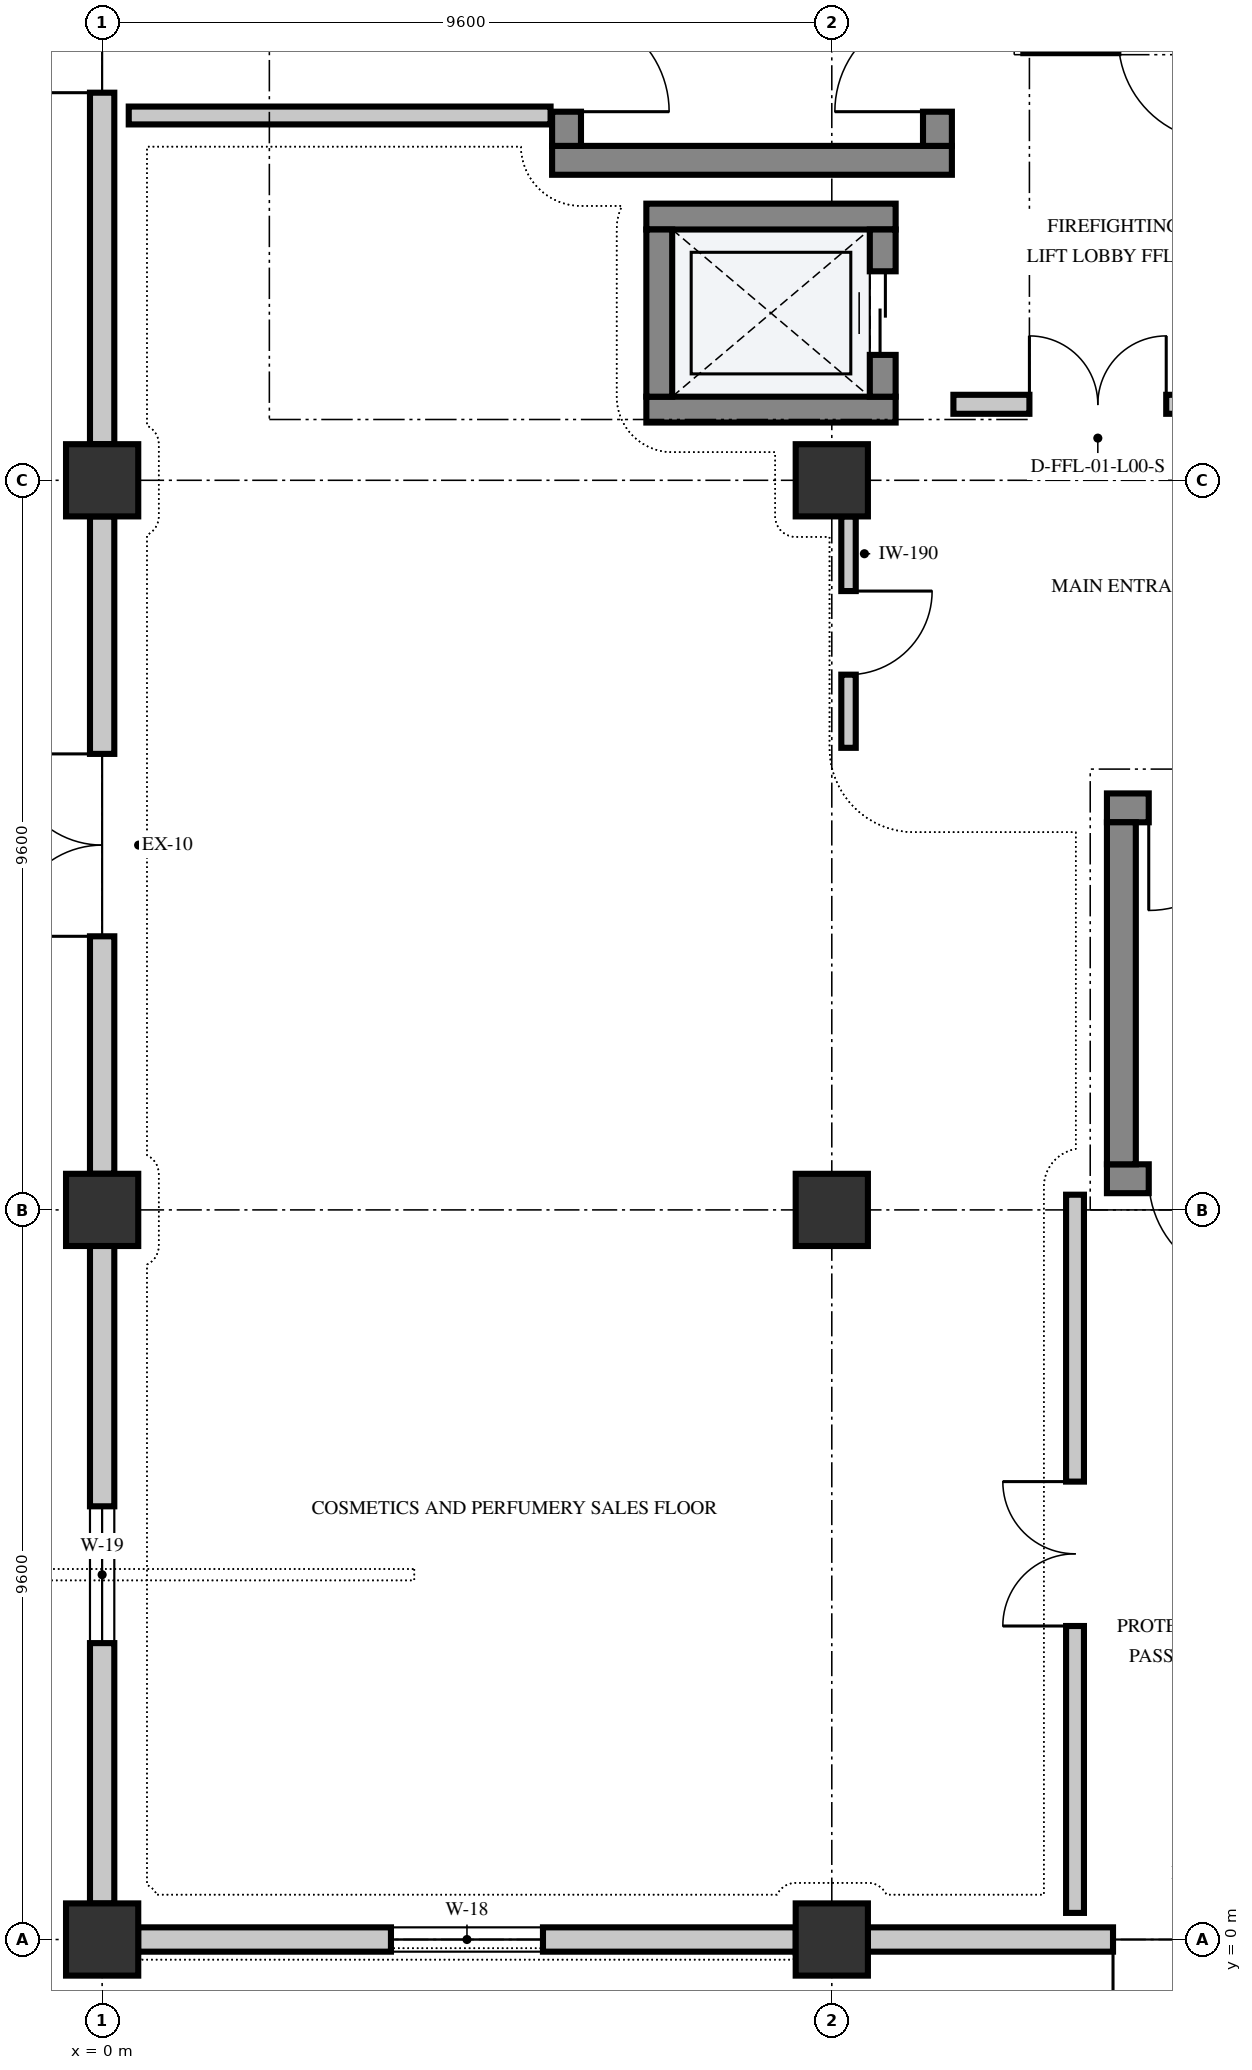
"""IFC4 building model, lengths in metres.
Left out: names, types, materials, properties, quantities, classifications, styles, units other than length and angle.
Written with IfcOpenShell. Run it as: python <this file> out.ifc"""

import sys

from ifc_helpers import new_model, si_unit, direction, frame, frame_2d, origin, origin_2d, place, context, subcontext, project, spatial, rectangle, extrude, element, fill, save


model = new_model("IFC4")
c1 = context("Model", 3, precision=1e-05, world=origin(), true_north=direction((0.0, 1.0)))
c2 = subcontext(c1, "Body", "Model", "MODEL_VIEW")
j1 = project(units=[si_unit("LENGTHUNIT", "METRE"), si_unit("PLANEANGLEUNIT", "RADIAN")], contexts=[c1])
p1 = place(None, origin())
s1 = spatial("IfcSite", under=j1, at=p1, CompositionType="ELEMENT")
p2 = place(p1, origin())
s2 = spatial("IfcBuilding", under=s1, at=p2, CompositionType="ELEMENT")
p3 = place(p2, origin())
s3 = spatial("IfcBuildingStorey", under=s2, at=p3, CompositionType="ELEMENT", Elevation=0.0)
for number, where, z_axis, x_axis in (
    (1, (0.0, 0.0, -0.3), (0.0, 0.0, 1.0), (1.0, 0.0, 0.0)),
    (2, (0.0, 9.6, -0.3), (0.0, 0.0, 1.0), (1.0, 0.0, 0.0)),
):
    element("IfcColumn", number, at=place(p3, frame(where, z_axis=z_axis, x_axis=x_axis)), inside=s3, PredefinedType="COLUMN", context=c2, shape_type="SweptSolid", body=[
        extrude(rectangle(XDim=0.95, YDim=0.95, at=origin_2d()), origin(), (0.0, 0.0, 1.0), 5.7),
    ])
p4 = place(p3, frame((0.0, 19.2, 0.0), z_axis=(0.0, 0.0, 1.0), x_axis=(1.0, 0.0, 0.0)))
e3 = element("IfcColumn", 3, at=p4, inside=s3, PredefinedType="COLUMN", context=c2, shape_type="SweptSolid", body=[
    extrude(rectangle(XDim=0.95, YDim=0.95, at=origin_2d()), origin(), (0.0, 0.0, 1.0), 5.4),
])
p5 = place(p3, frame((9.6, 0.0, -0.3), z_axis=(0.0, 0.0, 1.0), x_axis=(1.0, 0.0, 0.0)))
e4 = element("IfcColumn", 4, at=p5, inside=s3, PredefinedType="COLUMN", context=c2, shape_type="SweptSolid", body=[
    extrude(rectangle(XDim=0.95, YDim=0.95, at=origin_2d()), origin(), (0.0, 0.0, 1.0), 5.7),
])
for number, where, z_axis, x_axis in (
    (5, (9.6, 9.6, 0.0), (0.0, 0.0, 1.0), (1.0, 0.0, 0.0)),
    (6, (9.6, 19.2, 0.0), (0.0, 0.0, 1.0), (1.0, 0.0, 0.0)),
):
    element("IfcColumn", number, at=place(p3, frame(where, z_axis=z_axis, x_axis=x_axis)), inside=s3, PredefinedType="COLUMN", context=c2, shape_type="SweptSolid", body=[
        extrude(rectangle(XDim=0.95, YDim=0.95, at=origin_2d()), origin(), (0.0, 0.0, 1.0), 5.4),
    ])
p6 = place(p3, frame((18.725, 0.0, 0.0), z_axis=(0.0, 0.0, 1.0), x_axis=(-1.0, 0.0, 0.0)))
e7 = element("IfcWall", 7, at=p6, inside=s3, PredefinedType="SOLIDWALL", context=c2, shape_type="SweptSolid", body=[
    extrude(rectangle(XDim=8.65, YDim=0.32, at=frame_2d((4.325, 0.0))), origin(), (0.0, 0.0, 1.0), 5.09),
])
p7 = place(p6, frame((3.225, 0.0, 0.0)))
e8 = element("IfcOpeningElement", 8, at=p7, cuts=e7, PredefinedType="OPENING", context=c2, shape_type="SweptSolid", body=[
    extrude(rectangle(XDim=2.2, YDim=2.3, at=frame_2d((1.1, 1.15))), frame((0.0, 0.172, 0.0), z_axis=(0.0, -1.0, 0.0), x_axis=(1.0, 0.0, 0.0)), (0.0, 0.0, 1.0), 0.344),
])
p8 = place(p3, frame((9.127, 0.0, 0.0), z_axis=(0.0, 0.0, 1.0), x_axis=(-1.0, 0.0, 0.0)))
e9 = element("IfcWall", 9, at=p8, inside=s3, PredefinedType="SOLIDWALL", context=c2, shape_type="SweptSolid", body=[
    extrude(rectangle(XDim=8.654, YDim=0.32, at=frame_2d((4.327, 0.0))), origin(), (0.0, 0.0, 1.0), 5.09),
])
p9 = place(p8, frame((3.327, 0.0, 2.25)))
e10 = element("IfcOpeningElement", 10, at=p9, cuts=e9, PredefinedType="OPENING", context=c2, shape_type="SweptSolid", body=[
    extrude(rectangle(XDim=2.0, YDim=1.1, at=frame_2d((1.0, 0.55))), frame((0.0, 0.172, 0.0), z_axis=(0.0, -1.0, 0.0), x_axis=(1.0, 0.0, 0.0)), (0.0, 0.0, 1.0), 0.344),
])
p10 = place(p3, frame((0.0, 0.473, 0.0), z_axis=(0.0, 0.0, 1.0), x_axis=(0.0, 1.0, 0.0)))
e11 = element("IfcWall", 11, at=p10, inside=s3, PredefinedType="SOLIDWALL", context=c2, shape_type="SweptSolid", body=[
    extrude(rectangle(XDim=8.654, YDim=0.32, at=frame_2d((4.327, 0.0))), origin(), (0.0, 0.0, 1.0), 5.09),
])
p11 = place(p10, frame((3.427, 0.0, 1.2)))
e12 = element("IfcOpeningElement", 12, at=p11, cuts=e11, PredefinedType="OPENING", context=c2, shape_type="SweptSolid", body=[
    extrude(rectangle(XDim=1.8, YDim=1.5, at=frame_2d((0.9, 0.75))), frame((0.0, 0.172, 0.0), z_axis=(0.0, -1.0, 0.0), x_axis=(1.0, 0.0, 0.0)), (0.0, 0.0, 1.0), 0.344),
])
p12 = place(p3, frame((0.0, 10.075, 0.0), z_axis=(0.0, 0.0, 1.0), x_axis=(0.0, 1.0, 0.0)))
e13 = element("IfcWall", 13, at=p12, inside=s3, PredefinedType="SOLIDWALL", context=c2, shape_type="SweptSolid", body=[
    extrude(rectangle(XDim=8.65, YDim=0.32, at=frame_2d((4.325, 0.0))), origin(), (0.0, 0.0, 1.0), 5.09),
])
p13 = place(p12, frame((3.125, 0.0, 0.0)))
e14 = element("IfcOpeningElement", 14, at=p13, cuts=e13, PredefinedType="OPENING", context=c2, shape_type="SweptSolid", body=[
    extrude(rectangle(XDim=2.4, YDim=2.6, at=frame_2d((1.2, 1.3))), frame((0.0, 0.172, 0.0), z_axis=(0.0, -1.0, 0.0), x_axis=(1.0, 0.0, 0.0)), (0.0, 0.0, 1.0), 0.344),
])
p14 = place(p3, frame((0.0, 19.675, 0.0), z_axis=(0.0, 0.0, 1.0), x_axis=(0.0, 1.0, 0.0)))
e15 = element("IfcWall", 15, at=p14, inside=s3, PredefinedType="SOLIDWALL", context=c2, shape_type="SweptSolid", body=[
    extrude(rectangle(XDim=8.65, YDim=0.32, at=frame_2d((4.325, 0.0))), origin(), (0.0, 0.0, 1.0), 5.09),
])
p15 = place(p14, frame((4.625, 0.0, 0.0)))
e16 = element("IfcOpeningElement", 16, at=p15, cuts=e15, PredefinedType="OPENING", context=c2, shape_type="SweptSolid", body=[
    extrude(rectangle(XDim=2.2, YDim=2.4, at=frame_2d((1.1, 1.2))), frame((0.0, 0.172, 0.0), z_axis=(0.0, -1.0, 0.0), x_axis=(1.0, 0.0, 0.0)), (0.0, 0.0, 1.0), 0.344),
])
p16 = place(p3, frame((5.92, 23.41, 0.0), z_axis=(0.0, 0.0, 1.0), x_axis=(1.0, 0.0, 0.0)))
e17 = element("IfcWall", 17, at=p16, inside=s3, PredefinedType="SHEAR", context=c2, shape_type="SweptSolid", body=[
    extrude(rectangle(XDim=5.26, YDim=0.38, at=frame_2d((2.63, 0.0))), origin(), (0.0, 0.0, 1.0), 5.09),
])
p17 = place(p3, frame((10.99, 23.6, 0.0), z_axis=(0.0, 0.0, 1.0), x_axis=(0.0, 1.0, 0.0)))
e18 = element("IfcWall", 18, at=p17, inside=s3, PredefinedType="SHEAR", context=c2, shape_type="SweptSolid", body=[
    extrude(rectangle(XDim=8.8, YDim=0.38, at=frame_2d((4.4, 0.0))), origin(), (0.0, 0.0, 1.0), 5.09),
])
p18 = place(p17, frame((0.45, 0.0, 0.0)))
e19 = element("IfcOpeningElement", 19, at=p18, cuts=e18, PredefinedType="OPENING", context=c2, shape_type="SweptSolid", body=[
    extrude(rectangle(XDim=1.35, YDim=2.2, at=frame_2d((0.675, 1.1))), frame((0.0, 0.202, 0.0), z_axis=(0.0, -1.0, 0.0), x_axis=(1.0, 0.0, 0.0)), (0.0, 0.0, 1.0), 0.404),
])
p19 = place(p3, frame((6.11, 23.6, 0.0), z_axis=(0.0, 0.0, 1.0), x_axis=(0.0, 1.0, 0.0)))
e20 = element("IfcWall", 20, at=p19, inside=s3, PredefinedType="SHEAR", context=c2, shape_type="SweptSolid", body=[
    extrude(rectangle(XDim=8.8, YDim=0.38, at=frame_2d((4.4, 0.0))), origin(), (0.0, 0.0, 1.0), 5.09),
])
p20 = place(p19, frame((0.45, 0.0, 0.0)))
e21 = element("IfcOpeningElement", 21, at=p20, cuts=e20, PredefinedType="OPENING", context=c2, shape_type="SweptSolid", body=[
    extrude(rectangle(XDim=1.35, YDim=2.2, at=frame_2d((0.675, 1.1))), frame((0.0, 0.202, 0.0), z_axis=(0.0, -1.0, 0.0), x_axis=(1.0, 0.0, 0.0)), (0.0, 0.0, 1.0), 0.404),
])
p21 = place(p3, frame((13.22, 10.01, 0.0), z_axis=(0.0, 0.0, 1.0), x_axis=(1.0, 0.0, 0.0)))
e22 = element("IfcWall", 22, at=p21, inside=s3, PredefinedType="SHEAR", context=c2, shape_type="SweptSolid", body=[
    extrude(rectangle(XDim=9.56, YDim=0.38, at=frame_2d((4.78, 0.0))), origin(), (0.0, 0.0, 1.0), 5.09),
])
p22 = place(p21, frame((0.55, 0.0, 0.0)))
e23 = element("IfcOpeningElement", 23, at=p22, cuts=e22, PredefinedType="OPENING", context=c2, shape_type="SweptSolid", body=[
    extrude(rectangle(XDim=1.35, YDim=2.2, at=frame_2d((0.675, 1.1))), frame((0.0, 0.202, 0.0), z_axis=(0.0, -1.0, 0.0), x_axis=(1.0, 0.0, 0.0)), (0.0, 0.0, 1.0), 0.404),
])
p23 = place(p3, frame((13.22, 14.89, 0.0), z_axis=(0.0, 0.0, 1.0), x_axis=(1.0, 0.0, 0.0)))
e24 = element("IfcWall", 24, at=p23, inside=s3, PredefinedType="SHEAR", context=c2, shape_type="SweptSolid", body=[
    extrude(rectangle(XDim=9.56, YDim=0.38, at=frame_2d((4.78, 0.0))), origin(), (0.0, 0.0, 1.0), 5.09),
])
p24 = place(p23, frame((0.55, 0.0, 0.0)))
e25 = element("IfcOpeningElement", 25, at=p24, cuts=e24, PredefinedType="OPENING", context=c2, shape_type="SweptSolid", body=[
    extrude(rectangle(XDim=1.35, YDim=2.2, at=frame_2d((0.675, 1.1))), frame((0.0, 0.202, 0.0), z_axis=(0.0, -1.0, 0.0), x_axis=(1.0, 0.0, 0.0)), (0.0, 0.0, 1.0), 0.404),
])
p25 = place(p3, frame((13.41, 10.2, 0.0), z_axis=(0.0, 0.0, 1.0), x_axis=(0.0, 1.0, 0.0)))
e26 = element("IfcWall", 26, at=p25, inside=s3, PredefinedType="SHEAR", context=c2, shape_type="SweptSolid", body=[
    extrude(rectangle(XDim=4.5, YDim=0.38, at=frame_2d((2.25, 0.0))), origin(), (0.0, 0.0, 1.0), 5.09),
])
p26 = place(p3, frame((12.12, 25.01, 0.0), z_axis=(0.0, 0.0, 1.0), x_axis=(1.0, 0.0, 0.0)))
e27 = element("IfcWall", 27, at=p26, inside=s3, PredefinedType="SHEAR", context=c2, shape_type="SweptSolid", body=[
    extrude(rectangle(XDim=5.26, YDim=0.38, at=frame_2d((2.63, 0.0))), origin(), (0.0, 0.0, 1.0), 5.09),
])
p27 = place(p26, frame((1.25, 0.0, 0.0)))
e28 = element("IfcOpeningElement", 28, at=p27, cuts=e27, PredefinedType="OPENING", context=c2, shape_type="SweptSolid", body=[
    extrude(rectangle(XDim=1.35, YDim=2.2, at=frame_2d((0.675, 1.1))), frame((0.0, 0.202, 0.0), z_axis=(0.0, -1.0, 0.0), x_axis=(1.0, 0.0, 0.0)), (0.0, 0.0, 1.0), 0.404),
])
for number, where, z_axis, x_axis in (
    (29, (7.16, 20.13, 0.0), (0.0, 0.0, 1.0), (1.0, 0.0, 0.0)),
    (30, (7.16, 22.67, 0.0), (0.0, 0.0, 1.0), (1.0, 0.0, 0.0)),
):
    element("IfcWall", number, at=place(p3, frame(where, z_axis=z_axis, x_axis=x_axis)), inside=s3, PredefinedType="SHEAR", context=c2, shape_type="SweptSolid", body=[
        extrude(rectangle(XDim=3.28, YDim=0.34, at=frame_2d((1.64, 0.0))), origin(), (0.0, 0.0, 1.0), 5.09),
    ])
p28 = place(p3, frame((7.33, 20.3, 0.0), z_axis=(0.0, 0.0, 1.0), x_axis=(0.0, 1.0, 0.0)))
e31 = element("IfcWall", 31, at=p28, inside=s3, PredefinedType="SHEAR", context=c2, shape_type="SweptSolid", body=[
    extrude(rectangle(XDim=2.2, YDim=0.34, at=frame_2d((1.1, 0.0))), origin(), (0.0, 0.0, 1.0), 5.09),
])
p29 = place(p3, frame((10.27, 20.3, 0.0), z_axis=(0.0, 0.0, 1.0), x_axis=(0.0, 1.0, 0.0)))
e32 = element("IfcWall", 32, at=p29, inside=s3, PredefinedType="SHEAR", context=c2, shape_type="SweptSolid", body=[
    extrude(rectangle(XDim=2.2, YDim=0.34, at=frame_2d((1.1, 0.0))), origin(), (0.0, 0.0, 1.0), 5.09),
])
p30 = place(p29, frame((0.55, 0.0, 0.0)))
e33 = element("IfcOpeningElement", 33, at=p30, cuts=e32, PredefinedType="OPENING", context=c2, shape_type="SweptSolid", body=[
    extrude(rectangle(XDim=1.1, YDim=2.15, at=frame_2d((0.55, 1.075))), frame((0.0, 0.182, 0.0), z_axis=(0.0, -1.0, 0.0), x_axis=(1.0, 0.0, 0.0)), (0.0, 0.0, 1.0), 0.364),
])
p31 = place(p3, frame((11.2, 20.2, 0.0), z_axis=(0.0, 0.0, 1.0), x_axis=(1.0, 0.0, 0.0)))
e34 = element("IfcWall", 34, at=p31, inside=s3, PredefinedType="PARTITIONING", context=c2, shape_type="SweptSolid", body=[
    extrude(rectangle(XDim=3.8, YDim=0.25, at=frame_2d((1.9, 0.0))), origin(), (0.0, 0.0, 1.0), 5.09),
])
p32 = place(p31, frame((1.0, 0.0, 0.0)))
e35 = element("IfcOpeningElement", 35, at=p32, cuts=e34, PredefinedType="OPENING", context=c2, shape_type="SweptSolid", body=[
    extrude(rectangle(XDim=1.8, YDim=2.25, at=frame_2d((0.9, 1.125))), frame((0.0, 0.137, 0.0), z_axis=(0.0, -1.0, 0.0), x_axis=(1.0, 0.0, 0.0)), (0.0, 0.0, 1.0), 0.274),
])
p33 = place(p3, frame((0.35, 24.0, 0.0), z_axis=(0.0, 0.0, 1.0), x_axis=(1.0, 0.0, 0.0)))
e36 = element("IfcWall", 36, at=p33, inside=s3, PredefinedType="PARTITIONING", context=c2, shape_type="SweptSolid", body=[
    extrude(rectangle(XDim=5.55, YDim=0.235, at=frame_2d((2.775, 0.0))), origin(), (0.0, 0.0, 1.0), 5.09),
])
p34 = place(p3, frame((12.8, 0.35, 0.0), z_axis=(0.0, 0.0, 1.0), x_axis=(0.0, 1.0, 0.0)))
e37 = element("IfcWall", 37, at=p34, inside=s3, PredefinedType="PARTITIONING", context=c2, shape_type="SweptSolid", body=[
    extrude(rectangle(XDim=9.45, YDim=0.235, at=frame_2d((4.725, 0.0))), origin(), (0.0, 0.0, 1.0), 5.09),
])
p35 = place(p34, frame((3.775, 0.0, 0.0)))
e38 = element("IfcOpeningElement", 38, at=p35, cuts=e37, PredefinedType="OPENING", context=c2, shape_type="SweptSolid", body=[
    extrude(rectangle(XDim=1.9, YDim=2.25, at=frame_2d((0.95, 1.125))), frame((0.0, 0.129, 0.0), z_axis=(0.0, -1.0, 0.0), x_axis=(1.0, 0.0, 0.0)), (0.0, 0.0, 1.0), 0.259),
])
p36 = place(p3, frame((9.82, 18.725, 0.0), z_axis=(0.0, 0.0, 1.0), x_axis=(0.0, -1.0, 0.0)))
e39 = element("IfcWall", 39, at=p36, inside=s3, PredefinedType="PARTITIONING", context=c2, shape_type="SweptSolid", body=[
    extrude(rectangle(XDim=3.045, YDim=0.19, at=frame_2d((1.522, 0.0))), origin(), (0.0, 0.0, 1.0), 4.03),
])
p37 = place(p36, frame((0.982, 0.0, 0.0)))
e40 = element("IfcOpeningElement", 40, at=p37, cuts=e39, PredefinedType="OPENING", context=c2, shape_type="SweptSolid", body=[
    extrude(rectangle(XDim=1.1, YDim=2.15, at=frame_2d((0.55, 1.075))), frame((0.0, 0.107, 0.0), z_axis=(0.0, -1.0, 0.0), x_axis=(1.0, 0.0, 0.0)), (0.0, 0.0, 1.0), 0.214),
])
p38 = place(p7, origin())
e41 = element("IfcDoor", 41, at=p38, inside=s3, OperationType="DOUBLE_DOOR_SINGLE_SWING", PredefinedType="DOOR", context=c2, shape_type="SweptSolid", body=[
    extrude(rectangle(XDim=2.2, YDim=2.3, at=frame_2d((1.1, 1.15))), frame((0.0, 0.025, 0.0), z_axis=(0.0, -1.0, 0.0), x_axis=(1.0, 0.0, 0.0)), (0.0, 0.0, 1.0), 0.05),
])
fill(e8, e41)
p39 = place(p9, origin())
e42 = element("IfcWindow", 42, at=p39, inside=s3, PartitioningType="SINGLE_PANEL", PredefinedType="WINDOW", context=c2, shape_type="SweptSolid", body=[
    extrude(rectangle(XDim=2.0, YDim=1.1, at=frame_2d((1.0, 0.55))), frame((0.0, 0.03, 0.0), z_axis=(0.0, -1.0, 0.0), x_axis=(1.0, 0.0, 0.0)), (0.0, 0.0, 1.0), 0.06),
])
fill(e10, e42)
p40 = place(p11, origin())
e43 = element("IfcWindow", 43, at=p40, inside=s3, PartitioningType="SINGLE_PANEL", PredefinedType="WINDOW", context=c2, shape_type="SweptSolid", body=[
    extrude(rectangle(XDim=1.8, YDim=1.5, at=frame_2d((0.9, 0.75))), frame((0.0, 0.03, 0.0), z_axis=(0.0, -1.0, 0.0), x_axis=(1.0, 0.0, 0.0)), (0.0, 0.0, 1.0), 0.06),
])
fill(e12, e43)
p41 = place(p13, origin())
e44 = element("IfcDoor", 44, at=p41, inside=s3, OperationType="DOUBLE_DOOR_SINGLE_SWING", PredefinedType="DOOR", context=c2, shape_type="SweptSolid", body=[
    extrude(rectangle(XDim=2.4, YDim=2.6, at=frame_2d((1.2, 1.3))), frame((0.0, 0.025, 0.0), z_axis=(0.0, -1.0, 0.0), x_axis=(1.0, 0.0, 0.0)), (0.0, 0.0, 1.0), 0.05),
])
fill(e14, e44)
p42 = place(p15, origin())
e45 = element("IfcDoor", 45, at=p42, inside=s3, OperationType="DOUBLE_DOOR_SINGLE_SWING", PredefinedType="DOOR", context=c2, shape_type="SweptSolid", body=[
    extrude(rectangle(XDim=2.2, YDim=2.4, at=frame_2d((1.1, 1.2))), frame((0.0, 0.025, 0.0), z_axis=(0.0, -1.0, 0.0), x_axis=(1.0, 0.0, 0.0)), (0.0, 0.0, 1.0), 0.05),
])
fill(e16, e45)
p43 = place(p18, origin())
e46 = element("IfcDoor", 46, at=p43, inside=s3, OperationType="SINGLE_SWING_LEFT", PredefinedType="DOOR", context=c2, shape_type="SweptSolid", body=[
    extrude(rectangle(XDim=1.35, YDim=2.2, at=frame_2d((0.675, 1.1))), frame((0.0, 0.025, 0.0), z_axis=(0.0, -1.0, 0.0), x_axis=(1.0, 0.0, 0.0)), (0.0, 0.0, 1.0), 0.05),
])
fill(e19, e46)
p44 = place(p20, frame((1.35, 0.0, 0.0), z_axis=(0.0, 0.0, 1.0), x_axis=(-1.0, 0.0, 0.0)))
e47 = element("IfcDoor", 47, at=p44, inside=s3, OperationType="SINGLE_SWING_RIGHT", PredefinedType="DOOR", context=c2, shape_type="SweptSolid", body=[
    extrude(rectangle(XDim=1.35, YDim=2.2, at=frame_2d((0.675, 1.1))), frame((0.0, 0.025, 0.0), z_axis=(0.0, -1.0, 0.0), x_axis=(1.0, 0.0, 0.0)), (0.0, 0.0, 1.0), 0.05),
])
fill(e21, e47)
p45 = place(p24, frame((1.35, 0.0, 0.0), z_axis=(0.0, 0.0, 1.0), x_axis=(-1.0, 0.0, 0.0)))
e48 = element("IfcDoor", 48, at=p45, inside=s3, OperationType="SINGLE_SWING_RIGHT", PredefinedType="DOOR", context=c2, shape_type="SweptSolid", body=[
    extrude(rectangle(XDim=1.35, YDim=2.2, at=frame_2d((0.675, 1.1))), frame((0.0, 0.025, 0.0), z_axis=(0.0, -1.0, 0.0), x_axis=(1.0, 0.0, 0.0)), (0.0, 0.0, 1.0), 0.05),
])
fill(e25, e48)
p46 = place(p22, frame((1.35, 0.0, 0.0), z_axis=(0.0, 0.0, 1.0), x_axis=(-1.0, 0.0, 0.0)))
e49 = element("IfcDoor", 49, at=p46, inside=s3, OperationType="SINGLE_SWING_LEFT", PredefinedType="DOOR", context=c2, shape_type="SweptSolid", body=[
    extrude(rectangle(XDim=1.35, YDim=2.2, at=frame_2d((0.675, 1.1))), frame((0.0, 0.025, 0.0), z_axis=(0.0, -1.0, 0.0), x_axis=(1.0, 0.0, 0.0)), (0.0, 0.0, 1.0), 0.05),
])
fill(e23, e49)
p47 = place(p30, origin())
e50 = element("IfcDoor", 50, at=p47, inside=s3, OperationType="DOUBLE_DOOR_SLIDING", PredefinedType="DOOR", context=c2, shape_type="SweptSolid", body=[
    extrude(rectangle(XDim=1.1, YDim=2.15, at=frame_2d((0.55, 1.075))), frame((0.0, 0.025, 0.0), z_axis=(0.0, -1.0, 0.0), x_axis=(1.0, 0.0, 0.0)), (0.0, 0.0, 1.0), 0.05),
])
fill(e33, e50)
p48 = place(p32, origin())
e51 = element("IfcDoor", 51, at=p48, inside=s3, OperationType="DOUBLE_DOOR_SINGLE_SWING", PredefinedType="DOOR", context=c2, shape_type="SweptSolid", body=[
    extrude(rectangle(XDim=1.8, YDim=2.25, at=frame_2d((0.9, 1.125))), frame((0.0, 0.025, 0.0), z_axis=(0.0, -1.0, 0.0), x_axis=(1.0, 0.0, 0.0)), (0.0, 0.0, 1.0), 0.05),
])
fill(e35, e51)
p49 = place(p35, origin())
e52 = element("IfcDoor", 52, at=p49, inside=s3, OperationType="DOUBLE_DOOR_SINGLE_SWING", PredefinedType="DOOR", context=c2, shape_type="SweptSolid", body=[
    extrude(rectangle(XDim=1.9, YDim=2.25, at=frame_2d((0.95, 1.125))), frame((0.0, 0.025, 0.0), z_axis=(0.0, -1.0, 0.0), x_axis=(1.0, 0.0, 0.0)), (0.0, 0.0, 1.0), 0.05),
])
fill(e38, e52)
p50 = place(p37, origin())
e53 = element("IfcDoor", 53, at=p50, inside=s3, OperationType="SINGLE_SWING_LEFT", PredefinedType="DOOR", context=c2, shape_type="SweptSolid", body=[
    extrude(rectangle(XDim=1.1, YDim=2.15, at=frame_2d((0.55, 1.075))), frame((0.0, 0.025, 0.0), z_axis=(0.0, -1.0, 0.0), x_axis=(1.0, 0.0, 0.0)), (0.0, 0.0, 1.0), 0.05),
])
fill(e40, e53)
save(model, sys.argv[1])
